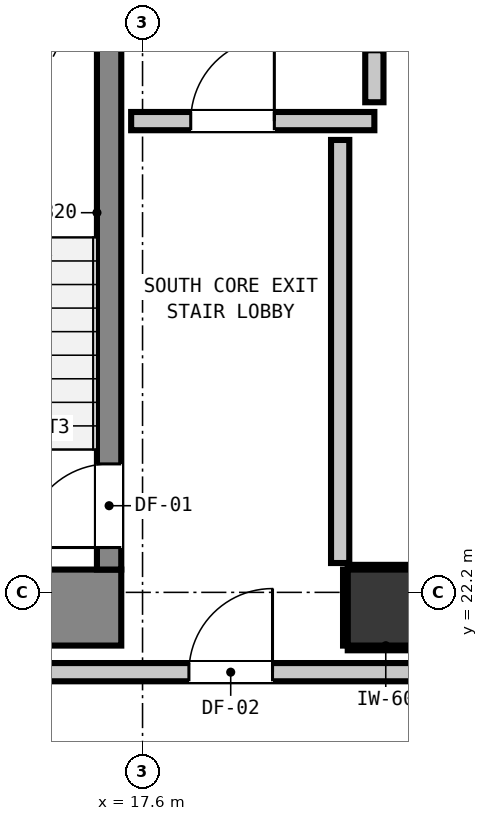
"""IFC4 building model, lengths in metres.
Left out: names, types, materials, properties, quantities, classifications, styles, units other than length and angle.
Written with IfcOpenShell. Run it as: python <this file> out.ifc"""

import sys

from ifc_helpers import new_model, si_unit, direction, frame, frame_2d, origin, origin_2d, place, context, subcontext, project, spatial, rectangle, extrude, element, fill, save


model = new_model("IFC4")
c1 = context("Model", 3, precision=1e-05, world=origin(), true_north=direction((0.0, 1.0)))
c2 = subcontext(c1, "Body", "Model", "MODEL_VIEW")
j1 = project(units=[si_unit("LENGTHUNIT", "METRE"), si_unit("PLANEANGLEUNIT", "RADIAN")], contexts=[c1])
p1 = place(None, origin())
s1 = spatial("IfcSite", under=j1, at=p1, CompositionType="ELEMENT")
p2 = place(p1, origin())
s2 = spatial("IfcBuilding", under=s1, at=p2, CompositionType="ELEMENT")
p3 = place(p2, frame((0.0, 0.0, 122.68)))
s3 = spatial("IfcBuildingStorey", under=s2, at=p3, CompositionType="ELEMENT", Elevation=122.68)
p4 = place(p3, frame((20.8, 22.0, 0.0), z_axis=(0.0, 0.0, 1.0), x_axis=(1.0, 0.0, 0.0)))
e1 = element("IfcColumn", 1, at=p4, inside=s3, PredefinedType="COLUMN", context=c2, shape_type="SweptSolid", body=[
    extrude(rectangle(XDim=1.0, YDim=1.0, at=origin_2d()), origin(), (0.0, 0.0, 1.0), 3.32),
])
p5 = place(p3, frame((13.24, 22.0, 0.0), z_axis=(0.0, 0.0, 1.0), x_axis=(1.0, 0.0, 0.0)))
e2 = element("IfcWall", 2, at=p5, inside=s3, PredefinedType="SHEAR", context=c2, shape_type="SweptSolid", body=[
    extrude(rectangle(XDim=4.08, YDim=1.0, at=frame_2d((2.04, 0.0))), origin(), (0.0, 0.0, 1.0), 3.32),
])
p6 = place(p3, frame((17.16, 22.5, 0.0), z_axis=(0.0, 0.0, 1.0), x_axis=(0.0, 1.0, 0.0)))
e3 = element("IfcWall", 3, at=p6, inside=s3, PredefinedType="SHEAR", context=c2, shape_type="SweptSolid", body=[
    extrude(rectangle(XDim=7.9, YDim=0.32, at=frame_2d((3.95, 0.0))), origin(), (0.0, 0.0, 1.0), 3.32),
])
p7 = place(p6, frame((0.29, 0.0, 0.0)))
e4 = element("IfcOpeningElement", 4, at=p7, cuts=e3, PredefinedType="OPENING", context=c2, shape_type="SweptSolid", body=[
    extrude(rectangle(XDim=1.1, YDim=2.15, at=frame_2d((0.55, 1.075))), frame((0.0, 0.17, 0.0), z_axis=(0.0, -1.0, 0.0), x_axis=(1.0, 0.0, 0.0)), (0.0, 0.0, 1.0), 0.34),
])
p8 = place(p3, frame((3.207, 21.15, 0.0), z_axis=(0.0, 0.0, 1.0), x_axis=(1.0, 0.0, 0.0)))
e5 = element("IfcWall", 5, at=p8, inside=s3, PredefinedType="PARTITIONING", context=c2, shape_type="SweptSolid", body=[
    extrude(rectangle(XDim=39.386, YDim=0.24, at=frame_2d((19.693, 0.0))), origin(), (0.0, 0.0, 1.0), 2.9),
])
p9 = place(p8, frame((15.003, 0.0, 0.0)))
e6 = element("IfcOpeningElement", 6, at=p9, cuts=e5, PredefinedType="OPENING", context=c2, shape_type="SweptSolid", body=[
    extrude(rectangle(XDim=1.1, YDim=2.15, at=frame_2d((0.55, 1.075))), frame((0.0, 0.13, 0.0), z_axis=(0.0, -1.0, 0.0), x_axis=(1.0, 0.0, 0.0)), (0.0, 0.0, 1.0), 0.26),
])
p10 = place(p8, frame((7.243, 0.0, 0.0)))
e7 = element("IfcOpeningElement", 7, at=p10, cuts=e5, PredefinedType="OPENING", context=c2, shape_type="SweptSolid", body=[
    extrude(rectangle(XDim=1.4, YDim=2.15, at=frame_2d((0.7, 1.075))), frame((0.0, 0.13, 0.0), z_axis=(0.0, -1.0, 0.0), x_axis=(1.0, 0.0, 0.0)), (0.0, 0.0, 1.0), 0.26),
])
p11 = place(p8, frame((34.843, 0.0, 0.0)))
e8 = element("IfcOpeningElement", 8, at=p11, cuts=e5, PredefinedType="OPENING", context=c2, shape_type="SweptSolid", body=[
    extrude(rectangle(XDim=1.4, YDim=2.15, at=frame_2d((0.7, 1.075))), frame((0.0, 0.13, 0.0), z_axis=(0.0, -1.0, 0.0), x_axis=(1.0, 0.0, 0.0)), (0.0, 0.0, 1.0), 0.26),
])
p12 = place(p8, frame((3.042, 0.0, 0.0)))
e9 = element("IfcOpeningElement", 9, at=p12, cuts=e5, PredefinedType="OPENING", context=c2, shape_type="SweptSolid", body=[
    extrude(rectangle(XDim=0.9, YDim=2.1, at=frame_2d((0.45, 1.05))), frame((0.0, 0.13, 0.0), z_axis=(0.0, -1.0, 0.0), x_axis=(1.0, 0.0, 0.0)), (0.0, 0.0, 1.0), 0.26),
])
p13 = place(p3, frame((17.45, 28.4, 0.0), z_axis=(0.0, 0.0, 1.0), x_axis=(1.0, 0.0, 0.0)))
e10 = element("IfcWall", 10, at=p13, inside=s3, PredefinedType="PARTITIONING", context=c2, shape_type="SweptSolid", body=[
    extrude(rectangle(XDim=3.2, YDim=0.24, at=frame_2d((1.6, 0.0))), origin(), (0.0, 0.0, 1.0), 2.9),
])
p14 = place(p13, frame((0.784, 0.0, 0.0)))
e11 = element("IfcOpeningElement", 11, at=p14, cuts=e10, PredefinedType="OPENING", context=c2, shape_type="SweptSolid", body=[
    extrude(rectangle(XDim=1.1, YDim=2.15, at=frame_2d((0.55, 1.075))), frame((0.0, 0.13, 0.0), z_axis=(0.0, -1.0, 0.0), x_axis=(1.0, 0.0, 0.0)), (0.0, 0.0, 1.0), 0.26),
])
p15 = place(p3, frame((20.2, 22.586, 0.0), z_axis=(0.0, 0.0, 1.0), x_axis=(0.0, 1.0, 0.0)))
e12 = element("IfcWall", 12, at=p15, inside=s3, PredefinedType="PARTITIONING", context=c2, shape_type="SweptSolid", body=[
    extrude(rectangle(XDim=5.566, YDim=0.24, at=frame_2d((2.783, 0.0))), origin(), (0.0, 0.0, 1.0), 0.905),
])
p16 = place(p3, frame((20.65, 28.648, 0.0), z_axis=(0.0, 0.0, 1.0), x_axis=(0.0, 1.0, 0.0)))
e13 = element("IfcWall", 13, at=p16, inside=s3, PredefinedType="PARTITIONING", context=c2, shape_type="SweptSolid", body=[
    extrude(rectangle(XDim=0.684, YDim=0.24, at=frame_2d((0.342, 0.0))), origin(), (0.0, 0.0, 1.0), 0.905),
])
for number, where, z_axis, x_axis in (
    (14, (20.3, 21.468, 0.0), (0.0, 0.0, 1.0), (1.0, 0.0, 0.0)),
    (15, (20.3, 22.532, 0.0), (0.0, 0.0, 1.0), (1.0, 0.0, 0.0)),
    (16, (20.268, 21.5, 0.0), (0.0, 0.0, 1.0), (0.0, 1.0, 0.0)),
):
    element("IfcWall", number, at=place(p3, frame(where, z_axis=z_axis, x_axis=x_axis)), inside=s3, PredefinedType="PARTITIONING", context=c2, shape_type="SweptSolid", body=[
        extrude(rectangle(XDim=1.0, YDim=0.06, at=frame_2d((0.5, 0.0))), origin(), (0.0, 0.0, 1.0), 0.905),
    ])
p17 = place(p7, origin())
e17 = element("IfcDoor", 17, at=p17, inside=s3, OperationType="SINGLE_SWING_LEFT", PredefinedType="DOOR", context=c2, shape_type="SweptSolid", body=[
    extrude(rectangle(XDim=1.1, YDim=2.15, at=frame_2d((0.55, 1.075))), frame((0.0, 0.025, 0.0), z_axis=(0.0, -1.0, 0.0), x_axis=(1.0, 0.0, 0.0)), (0.0, 0.0, 1.0), 0.05),
])
fill(e4, e17)
p18 = place(p14, origin())
e18 = element("IfcDoor", 18, at=p18, inside=s3, OperationType="SINGLE_SWING_RIGHT", PredefinedType="DOOR", context=c2, shape_type="SweptSolid", body=[
    extrude(rectangle(XDim=1.1, YDim=2.15, at=frame_2d((0.55, 1.075))), frame((0.0, 0.025, 0.0), z_axis=(0.0, -1.0, 0.0), x_axis=(1.0, 0.0, 0.0)), (0.0, 0.0, 1.0), 0.05),
])
fill(e11, e18)
p19 = place(p9, origin())
e19 = element("IfcDoor", 19, at=p19, inside=s3, OperationType="SINGLE_SWING_RIGHT", PredefinedType="DOOR", context=c2, shape_type="SweptSolid", body=[
    extrude(rectangle(XDim=1.1, YDim=2.15, at=frame_2d((0.55, 1.075))), frame((0.0, 0.025, 0.0), z_axis=(0.0, -1.0, 0.0), x_axis=(1.0, 0.0, 0.0)), (0.0, 0.0, 1.0), 0.05),
])
fill(e6, e19)
save(model, sys.argv[1])
